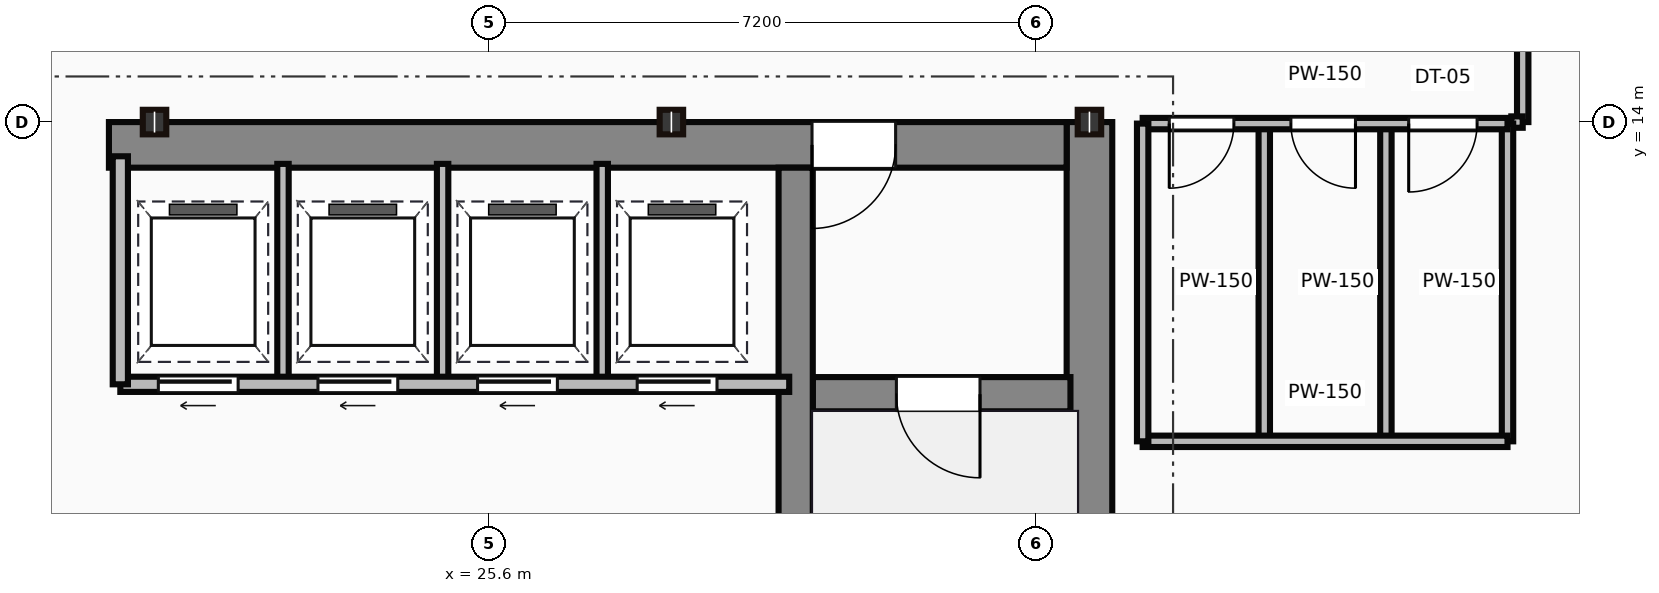
"""IFC4 building model, lengths in metres.
Left out: names, types, materials, properties, quantities, classifications, styles, units other than length and angle.
Written with IfcOpenShell. Run it as: python <this file> out.ifc"""

import sys

from ifc_helpers import new_model, si_unit, direction, frame, frame_2d, origin, origin_2d, place, context, subcontext, project, spatial, rectangle, i_section, extrude, source, transform, mapped, element, fill, save


model = new_model("IFC4")
c1 = context("Model", 3, precision=1e-05, world=origin(), true_north=direction((0.0, 1.0)))
c2 = subcontext(c1, "Body", "Model", "MODEL_VIEW")
j1 = project(units=[si_unit("LENGTHUNIT", "METRE"), si_unit("PLANEANGLEUNIT", "RADIAN")], contexts=[c1])
p1 = place(None, origin())
s1 = spatial("IfcSite", under=j1, at=p1, CompositionType="ELEMENT")
p2 = place(p1, origin())
s2 = spatial("IfcBuilding", under=s1, at=p2, CompositionType="ELEMENT")
p3 = place(p2, frame((0.0, 0.0, 199.55)))
s3 = spatial("IfcBuildingStorey", under=s2, at=p3, CompositionType="ELEMENT", Elevation=199.55)
m1 = source(origin(), c2, "Body", "SweptSolid", [
    extrude(rectangle(XDim=13.1, YDim=0.6, at=frame_2d((6.55, 0.0))), origin(), (0.0, 0.0, 1.0), 3.65),
])
p4 = place(p3, frame((33.5, 0.9, 0.0), z_axis=(0.0, 0.0, 1.0), x_axis=(0.0, 1.0, 0.0)))
e1 = element("IfcWall", 1, at=p4, inside=s3, PredefinedType="SHEAR", context=c2, shape_type="MappedRepresentation", body=[
    mapped(m1, transform((0.0, 0.0, 0.0))),
])
m2 = source(origin(), c2, "Body", "SweptSolid", [
    extrude(rectangle(XDim=12.6, YDim=0.6, at=frame_2d((6.3, 0.0))), origin(), (0.0, 0.0, 1.0), 3.65),
])
p5 = place(p3, frame((20.6, 13.7, 0.0), z_axis=(0.0, 0.0, 1.0), x_axis=(1.0, 0.0, 0.0)))
e2 = element("IfcWall", 2, at=p5, inside=s3, PredefinedType="SHEAR", context=c2, shape_type="MappedRepresentation", body=[
    mapped(m2, transform((0.0, 0.0, 0.0))),
])
p6 = place(p5, frame((9.25, 0.0, 0.0)))
e3 = element("IfcOpeningElement", 3, at=p6, cuts=e2, PredefinedType="OPENING", context=c2, shape_type="SweptSolid", body=[
    extrude(rectangle(XDim=1.1, YDim=2.15, at=frame_2d((0.55, 1.075))), frame((0.0, 0.31, 0.0), z_axis=(0.0, -1.0, 0.0), x_axis=(1.0, 0.0, 0.0)), (0.0, 0.0, 1.0), 0.62),
])
m3 = source(origin(), c2, "Body", "SweptSolid", [
    extrude(rectangle(XDim=12.5, YDim=0.45, at=frame_2d((6.25, 0.0))), origin(), (0.0, 0.0, 1.0), 3.65),
])
p7 = place(p3, frame((29.635, 0.9, 0.0), z_axis=(0.0, 0.0, 1.0), x_axis=(0.0, 1.0, 0.0)))
e4 = element("IfcWall", 4, at=p7, inside=s3, PredefinedType="SHEAR", context=c2, shape_type="MappedRepresentation", body=[
    mapped(m3, transform((0.0, 0.0, 0.0))),
])
m4 = source(origin(), c2, "Body", "SweptSolid", [
    extrude(rectangle(XDim=3.39, YDim=0.45, at=frame_2d((1.695, 0.0))), origin(), (0.0, 0.0, 1.0), 3.65),
])
p8 = place(p3, frame((29.86, 10.42, 0.0), z_axis=(0.0, 0.0, 1.0), x_axis=(1.0, 0.0, 0.0)))
e5 = element("IfcWall", 5, at=p8, inside=s3, PredefinedType="SHEAR", context=c2, shape_type="MappedRepresentation", body=[
    mapped(m4, transform((0.0, 0.0, 0.0))),
])
p9 = place(p8, frame((1.1, 0.0, 0.0)))
e6 = element("IfcOpeningElement", 6, at=p9, cuts=e5, PredefinedType="OPENING", context=c2, shape_type="SweptSolid", body=[
    extrude(rectangle(XDim=1.1, YDim=2.15, at=frame_2d((0.55, 1.075))), frame((0.0, 0.235, 0.0), z_axis=(0.0, -1.0, 0.0), x_axis=(1.0, 0.0, 0.0)), (0.0, 0.0, 1.0), 0.47),
])
m5 = source(origin(), c2, "Body", "SweptSolid", [
    extrude(i_section(OverallWidth=0.309, OverallDepth=0.323, WebThickness=0.014, FlangeThickness=0.023, at=origin_2d()), origin(), (0.0, 0.0, 1.0), 3.65),
])
for number, where, z_axis, x_axis in (
    (7, (21.2, 14.0, 0.0), (0.0, 0.0, 1.0), (1.0, 0.0, 0.0)),
    (8, (28.0, 14.0, 0.0), (0.0, 0.0, 1.0), (1.0, 0.0, 0.0)),
    (9, (33.5, 14.0, 0.0), (0.0, 0.0, 1.0), (1.0, 0.0, 0.0)),
):
    element("IfcColumn", number, at=place(p3, frame(where, z_axis=z_axis, x_axis=x_axis)), inside=s3, PredefinedType="COLUMN", context=c2, shape_type="MappedRepresentation", body=[
        mapped(m5, transform((0.0, 0.0, 0.0))),
    ])
m6 = source(origin(), c2, "Body", "SweptSolid", [
    extrude(rectangle(XDim=8.8, YDim=0.2, at=frame_2d((4.4, 0.0))), origin(), (0.0, 0.0, 1.0), 3.4),
])
p10 = place(p3, frame((20.75, 10.55, 0.0), z_axis=(0.0, 0.0, 1.0), x_axis=(1.0, 0.0, 0.0)))
e10 = element("IfcWall", 10, at=p10, inside=s3, PredefinedType="PARTITIONING", context=c2, shape_type="MappedRepresentation", body=[
    mapped(m6, transform((0.0, 0.0, 0.0))),
])
p11 = place(p10, frame((0.5, 0.0, 0.0)))
e11 = element("IfcOpeningElement", 11, at=p11, cuts=e10, PredefinedType="OPENING", context=c2, shape_type="SweptSolid", body=[
    extrude(rectangle(XDim=1.05, YDim=2.15, at=frame_2d((0.525, 1.075))), frame((0.0, 0.11, 0.0), z_axis=(0.0, -1.0, 0.0), x_axis=(1.0, 0.0, 0.0)), (0.0, 0.0, 1.0), 0.22),
])
p12 = place(p10, frame((2.6, 0.0, 0.0)))
e12 = element("IfcOpeningElement", 12, at=p12, cuts=e10, PredefinedType="OPENING", context=c2, shape_type="SweptSolid", body=[
    extrude(rectangle(XDim=1.05, YDim=2.15, at=frame_2d((0.525, 1.075))), frame((0.0, 0.11, 0.0), z_axis=(0.0, -1.0, 0.0), x_axis=(1.0, 0.0, 0.0)), (0.0, 0.0, 1.0), 0.22),
])
p13 = place(p10, frame((4.7, 0.0, 0.0)))
e13 = element("IfcOpeningElement", 13, at=p13, cuts=e10, PredefinedType="OPENING", context=c2, shape_type="SweptSolid", body=[
    extrude(rectangle(XDim=1.05, YDim=2.15, at=frame_2d((0.525, 1.075))), frame((0.0, 0.11, 0.0), z_axis=(0.0, -1.0, 0.0), x_axis=(1.0, 0.0, 0.0)), (0.0, 0.0, 1.0), 0.22),
])
p14 = place(p10, frame((6.8, 0.0, 0.0)))
e14 = element("IfcOpeningElement", 14, at=p14, cuts=e10, PredefinedType="OPENING", context=c2, shape_type="SweptSolid", body=[
    extrude(rectangle(XDim=1.05, YDim=2.15, at=frame_2d((0.525, 1.075))), frame((0.0, 0.11, 0.0), z_axis=(0.0, -1.0, 0.0), x_axis=(1.0, 0.0, 0.0)), (0.0, 0.0, 1.0), 0.22),
])
m7 = source(origin(), c2, "Body", "SweptSolid", [
    extrude(rectangle(XDim=3.0, YDim=0.2, at=frame_2d((1.5, 0.0))), origin(), (0.0, 0.0, 1.0), 3.4),
])
p15 = place(p3, frame((20.75, 10.55, 0.0), z_axis=(0.0, 0.0, 1.0), x_axis=(0.0, 1.0, 0.0)))
e15 = element("IfcWall", 15, at=p15, inside=s3, PredefinedType="PARTITIONING", context=c2, shape_type="MappedRepresentation", body=[
    mapped(m7, transform((0.0, 0.0, 0.0))),
])
m8 = source(origin(), c2, "Body", "SweptSolid", [
    extrude(rectangle(XDim=2.85, YDim=0.15, at=frame_2d((1.425, 0.0))), origin(), (0.0, 0.0, 1.0), 3.4),
])
for number, where, z_axis, x_axis in (
    (16, (22.89, 10.6, 0.0), (0.0, 0.0, 1.0), (0.0, 1.0, 0.0)),
    (17, (24.99, 10.6, 0.0), (0.0, 0.0, 1.0), (0.0, 1.0, 0.0)),
    (18, (27.09, 10.6, 0.0), (0.0, 0.0, 1.0), (0.0, 1.0, 0.0)),
):
    element("IfcWall", number, at=place(p3, frame(where, z_axis=z_axis, x_axis=x_axis)), inside=s3, PredefinedType="PARTITIONING", context=c2, shape_type="MappedRepresentation", body=[
        mapped(m8, transform((0.0, 0.0, 0.0))),
    ])
m9 = source(origin(), c2, "Body", "SweptSolid", [
    extrude(rectangle(XDim=4.8, YDim=0.15, at=frame_2d((2.4, 0.0))), origin(), (0.0, 0.0, 1.0), 2.787),
])
p16 = place(p3, frame((34.2, 13.98, 0.0), z_axis=(0.0, 0.0, 1.0), x_axis=(1.0, 0.0, 0.0)))
e19 = element("IfcWall", 19, at=p16, inside=s3, PredefinedType="PARTITIONING", context=c2, shape_type="MappedRepresentation", body=[
    mapped(m9, transform((0.0, 0.0, 0.0))),
])
p17 = place(p16, frame((0.35, 0.0, 0.0)))
e20 = element("IfcOpeningElement", 20, at=p17, cuts=e19, PredefinedType="OPENING", context=c2, shape_type="SweptSolid", body=[
    extrude(rectangle(XDim=0.85, YDim=2.1, at=frame_2d((0.425, 1.05))), frame((0.0, 0.085, 0.0), z_axis=(0.0, -1.0, 0.0), x_axis=(1.0, 0.0, 0.0)), (0.0, 0.0, 1.0), 0.17),
])
p18 = place(p16, frame((1.95, 0.0, 0.0)))
e21 = element("IfcOpeningElement", 21, at=p18, cuts=e19, PredefinedType="OPENING", context=c2, shape_type="SweptSolid", body=[
    extrude(rectangle(XDim=0.85, YDim=2.1, at=frame_2d((0.425, 1.05))), frame((0.0, 0.085, 0.0), z_axis=(0.0, -1.0, 0.0), x_axis=(1.0, 0.0, 0.0)), (0.0, 0.0, 1.0), 0.17),
])
p19 = place(p16, frame((3.5, 0.0, 0.0)))
e22 = element("IfcOpeningElement", 22, at=p19, cuts=e19, PredefinedType="OPENING", context=c2, shape_type="SweptSolid", body=[
    extrude(rectangle(XDim=0.9, YDim=2.1, at=frame_2d((0.45, 1.05))), frame((0.0, 0.085, 0.0), z_axis=(0.0, -1.0, 0.0), x_axis=(1.0, 0.0, 0.0)), (0.0, 0.0, 1.0), 0.17),
])
m10 = source(origin(), c2, "Body", "SweptSolid", [
    extrude(rectangle(XDim=4.8, YDim=0.15, at=frame_2d((2.4, 0.0))), origin(), (0.0, 0.0, 1.0), 3.4),
])
p20 = place(p3, frame((34.2, 9.8, 0.0), z_axis=(0.0, 0.0, 1.0), x_axis=(1.0, 0.0, 0.0)))
e23 = element("IfcWall", 23, at=p20, inside=s3, PredefinedType="PARTITIONING", context=c2, shape_type="MappedRepresentation", body=[
    mapped(m10, transform((0.0, 0.0, 0.0))),
])
m11 = source(origin(), c2, "Body", "SweptSolid", [
    extrude(rectangle(XDim=4.18, YDim=0.15, at=frame_2d((2.09, 0.0))), origin(), (0.0, 0.0, 1.0), 3.4),
])
for number, where, z_axis, x_axis in (
    (24, (39.0, 9.8, 0.0), (0.0, 0.0, 1.0), (0.0, 1.0, 0.0)),
    (25, (34.2, 9.8, 0.0), (0.0, 0.0, 1.0), (0.0, 1.0, 0.0)),
    (26, (35.8, 9.8, 0.0), (0.0, 0.0, 1.0), (0.0, 1.0, 0.0)),
    (27, (37.4, 9.8, 0.0), (0.0, 0.0, 1.0), (0.0, 1.0, 0.0)),
):
    element("IfcWall", number, at=place(p3, frame(where, z_axis=z_axis, x_axis=x_axis)), inside=s3, PredefinedType="PARTITIONING", context=c2, shape_type="MappedRepresentation", body=[
        mapped(m11, transform((0.0, 0.0, 0.0))),
    ])
m12 = source(origin(), c2, "Body", "SweptSolid", [
    extrude(rectangle(XDim=2.2, YDim=0.15, at=frame_2d((1.1, 0.0))), origin(), (0.0, 0.0, 1.0), 3.4),
])
p21 = place(p3, frame((39.2, 16.2, 0.0), z_axis=(0.0, 0.0, 1.0), x_axis=(0.0, -1.0, 0.0)))
e28 = element("IfcWall", 28, at=p21, inside=s3, PredefinedType="PARTITIONING", context=c2, shape_type="MappedRepresentation", body=[
    mapped(m12, transform((0.0, 0.0, 0.0))),
])
m13 = source(origin(), c2, "Body", "SweptSolid", [
    extrude(rectangle(XDim=0.15, YDim=0.15, at=frame_2d((0.075, 0.0))), origin(), (0.0, 0.0, 1.0), 3.4),
])
p22 = place(p3, frame((39.2, 14.0, 0.0), z_axis=(0.0, 0.0, 1.0), x_axis=(-1.0, 0.0, 0.0)))
e29 = element("IfcWall", 29, at=p22, inside=s3, PredefinedType="PARTITIONING", context=c2, shape_type="MappedRepresentation", body=[
    mapped(m13, transform((0.0, 0.0, 0.0))),
])
m14 = source(origin(), c2, "Body", "SweptSolid", [
    extrude(rectangle(XDim=1.1, YDim=2.15, at=frame_2d((0.55, 1.075))), frame((0.0, 0.025, 0.0), z_axis=(0.0, -1.0, 0.0), x_axis=(1.0, 0.0, 0.0)), (0.0, 0.0, 1.0), 0.05),
])
p23 = place(p9, frame((1.1, 0.0, 0.0), z_axis=(0.0, 0.0, 1.0), x_axis=(-1.0, 0.0, 0.0)))
e30 = element("IfcDoor", 30, at=p23, inside=s3, OperationType="SINGLE_SWING_RIGHT", PredefinedType="DOOR", context=c2, shape_type="MappedRepresentation", body=[
    mapped(m14, transform((0.0, 0.0, 0.0))),
])
fill(e6, e30)
p24 = place(p6, origin())
e31 = element("IfcDoor", 31, at=p24, inside=s3, OperationType="SINGLE_SWING_LEFT", PredefinedType="DOOR", context=c2, shape_type="MappedRepresentation", body=[
    mapped(m14, transform((0.0, 0.0, 0.0))),
])
fill(e3, e31)
m15 = source(origin(), c2, "Body", "SweptSolid", [
    extrude(rectangle(XDim=1.05, YDim=2.15, at=frame_2d((0.525, 1.075))), frame((0.0, 0.025, 0.0), z_axis=(0.0, -1.0, 0.0), x_axis=(1.0, 0.0, 0.0)), (0.0, 0.0, 1.0), 0.05),
])
p25 = place(p11, frame((1.05, 0.0, 0.0), z_axis=(0.0, 0.0, 1.0), x_axis=(-1.0, 0.0, 0.0)))
e32 = element("IfcDoor", 32, at=p25, inside=s3, OperationType="SLIDING_TO_LEFT", PredefinedType="DOOR", context=c2, shape_type="MappedRepresentation", body=[
    mapped(m15, transform((0.0, 0.0, 0.0))),
])
fill(e11, e32)
p26 = place(p12, frame((1.05, 0.0, 0.0), z_axis=(0.0, 0.0, 1.0), x_axis=(-1.0, 0.0, 0.0)))
e33 = element("IfcDoor", 33, at=p26, inside=s3, OperationType="SLIDING_TO_LEFT", PredefinedType="DOOR", context=c2, shape_type="MappedRepresentation", body=[
    mapped(m15, transform((0.0, 0.0, 0.0))),
])
fill(e12, e33)
p27 = place(p13, frame((1.05, 0.0, 0.0), z_axis=(0.0, 0.0, 1.0), x_axis=(-1.0, 0.0, 0.0)))
e34 = element("IfcDoor", 34, at=p27, inside=s3, OperationType="SLIDING_TO_LEFT", PredefinedType="DOOR", context=c2, shape_type="MappedRepresentation", body=[
    mapped(m15, transform((0.0, 0.0, 0.0))),
])
fill(e13, e34)
p28 = place(p14, frame((1.05, 0.0, 0.0), z_axis=(0.0, 0.0, 1.0), x_axis=(-1.0, 0.0, 0.0)))
e35 = element("IfcDoor", 35, at=p28, inside=s3, OperationType="SLIDING_TO_LEFT", PredefinedType="DOOR", context=c2, shape_type="MappedRepresentation", body=[
    mapped(m15, transform((0.0, 0.0, 0.0))),
])
fill(e14, e35)
m16 = source(origin(), c2, "Body", "SweptSolid", [
    extrude(rectangle(XDim=0.85, YDim=2.1, at=frame_2d((0.425, 1.05))), frame((0.0, 0.025, 0.0), z_axis=(0.0, -1.0, 0.0), x_axis=(1.0, 0.0, 0.0)), (0.0, 0.0, 1.0), 0.05),
])
p29 = place(p17, frame((0.85, 0.0, 0.0), z_axis=(0.0, 0.0, 1.0), x_axis=(-1.0, 0.0, 0.0)))
e36 = element("IfcDoor", 36, at=p29, inside=s3, OperationType="SINGLE_SWING_LEFT", PredefinedType="DOOR", context=c2, shape_type="MappedRepresentation", body=[
    mapped(m16, transform((0.0, 0.0, 0.0))),
])
fill(e20, e36)
p30 = place(p18, frame((0.85, 0.0, 0.0), z_axis=(0.0, 0.0, 1.0), x_axis=(-1.0, 0.0, 0.0)))
e37 = element("IfcDoor", 37, at=p30, inside=s3, OperationType="SINGLE_SWING_RIGHT", PredefinedType="DOOR", context=c2, shape_type="MappedRepresentation", body=[
    mapped(m16, transform((0.0, 0.0, 0.0))),
])
fill(e21, e37)
m17 = source(origin(), c2, "Body", "SweptSolid", [
    extrude(rectangle(XDim=0.9, YDim=2.1, at=frame_2d((0.45, 1.05))), frame((0.0, 0.025, 0.0), z_axis=(0.0, -1.0, 0.0), x_axis=(1.0, 0.0, 0.0)), (0.0, 0.0, 1.0), 0.05),
])
p31 = place(p19, frame((0.9, 0.0, 0.0), z_axis=(0.0, 0.0, 1.0), x_axis=(-1.0, 0.0, 0.0)))
e38 = element("IfcDoor", 38, at=p31, inside=s3, OperationType="SINGLE_SWING_LEFT", PredefinedType="DOOR", context=c2, shape_type="MappedRepresentation", body=[
    mapped(m17, transform((0.0, 0.0, 0.0))),
])
fill(e22, e38)
save(model, sys.argv[1])
